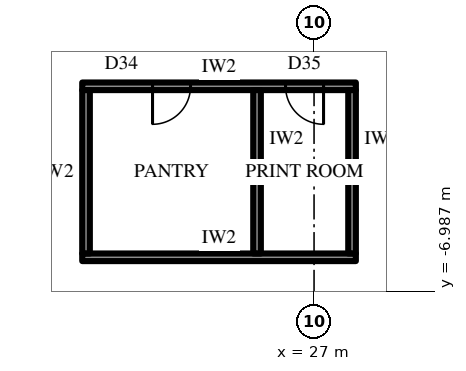
"""IFC4 building model, lengths in metres.
Left out: names, types, materials, properties, quantities, classifications, styles, units other than length and angle.
Written with IfcOpenShell. Run it as: python <this file> out.ifc"""

import sys

from ifc_helpers import new_model, si_unit, direction, frame, frame_2d, origin, place, context, subcontext, project, spatial, rectangle, extrude, element, fill, save


model = new_model("IFC4")
c1 = context("Model", 3, precision=1e-05, world=origin(), true_north=direction((0.0, 1.0)))
c2 = subcontext(c1, "Body", "Model", "MODEL_VIEW")
j1 = project(units=[si_unit("LENGTHUNIT", "METRE"), si_unit("PLANEANGLEUNIT", "RADIAN")], contexts=[c1])
p1 = place(None, origin())
s1 = spatial("IfcSite", under=j1, at=p1, CompositionType="ELEMENT")
p2 = place(p1, origin())
s2 = spatial("IfcBuilding", under=s1, at=p2, CompositionType="ELEMENT")
p3 = place(p2, frame((0.0, 0.0, 140.5)))
s3 = spatial("IfcBuildingStorey", under=s2, at=p3, CompositionType="ELEMENT", Elevation=140.5)
p4 = place(p3, frame((19.644, -28.675, 0.0), z_axis=(0.0, 0.0, 1.0), x_axis=(0.500003084452, 0.866023622968, 0.0)))
e1 = element("IfcWall", 1, at=p4, inside=s3, PredefinedType="SOLIDWALL", context=c2, shape_type="SweptSolid", body=[
    extrude(rectangle(XDim=30.022, YDim=0.3, at=frame_2d((15.011, 0.0))), origin(), (0.0, 0.0, 1.0), 2.75),
])
p5 = place(p4, frame((1.052, 0.0, 0.6)))
e2 = element("IfcOpeningElement", 2, at=p5, cuts=e1, PredefinedType="OPENING", context=c2, shape_type="SweptSolid", body=[
    extrude(rectangle(XDim=2.9, YDim=1.9, at=frame_2d((1.45, 0.95))), frame((0.0, 0.16, 0.0), z_axis=(0.0, -1.0, 0.0), x_axis=(1.0, 0.0, 0.0)), (0.0, 0.0, 1.0), 0.32),
])
p6 = place(p4, frame((6.056, 0.0, 0.6)))
e3 = element("IfcOpeningElement", 3, at=p6, cuts=e1, PredefinedType="OPENING", context=c2, shape_type="SweptSolid", body=[
    extrude(rectangle(XDim=2.9, YDim=1.9, at=frame_2d((1.45, 0.95))), frame((0.0, 0.16, 0.0), z_axis=(0.0, -1.0, 0.0), x_axis=(1.0, 0.0, 0.0)), (0.0, 0.0, 1.0), 0.32),
])
p7 = place(p4, frame((11.909, 0.0, 0.0)))
e4 = element("IfcOpeningElement", 4, at=p7, cuts=e1, PredefinedType="OPENING", context=c2, shape_type="SweptSolid", body=[
    extrude(rectangle(XDim=1.2, YDim=2.4, at=frame_2d((0.6, 1.2))), frame((0.0, 0.16, 0.0), z_axis=(0.0, -1.0, 0.0), x_axis=(1.0, 0.0, 0.0)), (0.0, 0.0, 1.0), 0.32),
])
p8 = place(p4, frame((16.063, 0.0, 0.6)))
e5 = element("IfcOpeningElement", 5, at=p8, cuts=e1, PredefinedType="OPENING", context=c2, shape_type="SweptSolid", body=[
    extrude(rectangle(XDim=2.9, YDim=1.9, at=frame_2d((1.45, 0.95))), frame((0.0, 0.16, 0.0), z_axis=(0.0, -1.0, 0.0), x_axis=(1.0, 0.0, 0.0)), (0.0, 0.0, 1.0), 0.32),
])
p9 = place(p4, frame((21.067, 0.0, 0.6)))
e6 = element("IfcOpeningElement", 6, at=p9, cuts=e1, PredefinedType="OPENING", context=c2, shape_type="SweptSolid", body=[
    extrude(rectangle(XDim=2.9, YDim=1.9, at=frame_2d((1.45, 0.95))), frame((0.0, 0.16, 0.0), z_axis=(0.0, -1.0, 0.0), x_axis=(1.0, 0.0, 0.0)), (0.0, 0.0, 1.0), 0.32),
])
p10 = place(p4, frame((26.07, 0.0, 0.6)))
e7 = element("IfcOpeningElement", 7, at=p10, cuts=e1, PredefinedType="OPENING", context=c2, shape_type="SweptSolid", body=[
    extrude(rectangle(XDim=2.9, YDim=1.9, at=frame_2d((1.45, 0.95))), frame((0.0, 0.16, 0.0), z_axis=(0.0, -1.0, 0.0), x_axis=(1.0, 0.0, 0.0)), (0.0, 0.0, 1.0), 0.32),
])
p11 = place(p3, frame((20.9, -1.6, 0.0), z_axis=(0.0, 0.0, 1.0), x_axis=(1.0, 0.0, 0.0)))
e8 = element("IfcWall", 8, at=p11, inside=s3, PredefinedType="PARTITIONING", context=c2, shape_type="SweptSolid", body=[
    extrude(rectangle(XDim=7.2, YDim=0.2, at=frame_2d((3.6, 0.0))), origin(), (0.0, 0.0, 1.0), 4.0),
])
p12 = place(p11, frame((1.85, 0.0, 0.0)))
e9 = element("IfcOpeningElement", 9, at=p12, cuts=e8, PredefinedType="OPENING", context=c2, shape_type="SweptSolid", body=[
    extrude(rectangle(XDim=1.0, YDim=2.2, at=frame_2d((0.5, 1.1))), frame((0.0, 0.11, 0.0), z_axis=(0.0, -1.0, 0.0), x_axis=(1.0, 0.0, 0.0)), (0.0, 0.0, 1.0), 0.22),
])
p13 = place(p11, frame((5.35, 0.0, 0.0)))
e10 = element("IfcOpeningElement", 10, at=p13, cuts=e8, PredefinedType="OPENING", context=c2, shape_type="SweptSolid", body=[
    extrude(rectangle(XDim=1.0, YDim=2.2, at=frame_2d((0.5, 1.1))), frame((0.0, 0.11, 0.0), z_axis=(0.0, -1.0, 0.0), x_axis=(1.0, 0.0, 0.0)), (0.0, 0.0, 1.0), 0.22),
])
p14 = place(p3, frame((20.9, -6.1, 0.0), z_axis=(0.0, 0.0, 1.0), x_axis=(1.0, 0.0, 0.0)))
e11 = element("IfcWall", 11, at=p14, inside=s3, PredefinedType="PARTITIONING", context=c2, shape_type="SweptSolid", body=[
    extrude(rectangle(XDim=7.2, YDim=0.2, at=frame_2d((3.6, 0.0))), origin(), (0.0, 0.0, 1.0), 4.0),
])
for number, where, z_axis, x_axis in (
    (12, (21.0, -1.7, 0.0), (0.0, 0.0, 1.0), (0.0, -1.0, 0.0)),
    (13, (25.5, -1.7, 0.0), (0.0, 0.0, 1.0), (0.0, -1.0, 0.0)),
    (14, (28.0, -1.7, 0.0), (0.0, 0.0, 1.0), (0.0, -1.0, 0.0)),
):
    element("IfcWall", number, at=place(p3, frame(where, z_axis=z_axis, x_axis=x_axis)), inside=s3, PredefinedType="PARTITIONING", context=c2, shape_type="SweptSolid", body=[
        extrude(rectangle(XDim=4.3, YDim=0.2, at=frame_2d((2.15, 0.0))), origin(), (0.0, 0.0, 1.0), 4.0),
    ])
p15 = place(p12, frame((1.0, 0.0, 0.0), z_axis=(0.0, 0.0, 1.0), x_axis=(-1.0, 0.0, 0.0)))
e15 = element("IfcDoor", 15, at=p15, inside=s3, OperationType="SINGLE_SWING_LEFT", PredefinedType="DOOR", context=c2, shape_type="SweptSolid", body=[
    extrude(rectangle(XDim=1.0, YDim=2.2, at=frame_2d((0.5, 1.1))), frame((0.0, 0.025, 0.0), z_axis=(0.0, -1.0, 0.0), x_axis=(1.0, 0.0, 0.0)), (0.0, 0.0, 1.0), 0.05),
])
fill(e9, e15)
p16 = place(p13, frame((1.0, 0.0, 0.0), z_axis=(0.0, 0.0, 1.0), x_axis=(-1.0, 0.0, 0.0)))
e16 = element("IfcDoor", 16, at=p16, inside=s3, OperationType="SINGLE_SWING_RIGHT", PredefinedType="DOOR", context=c2, shape_type="SweptSolid", body=[
    extrude(rectangle(XDim=1.0, YDim=2.2, at=frame_2d((0.5, 1.1))), frame((0.0, 0.025, 0.0), z_axis=(0.0, -1.0, 0.0), x_axis=(1.0, 0.0, 0.0)), (0.0, 0.0, 1.0), 0.05),
])
fill(e10, e16)
save(model, sys.argv[1])
